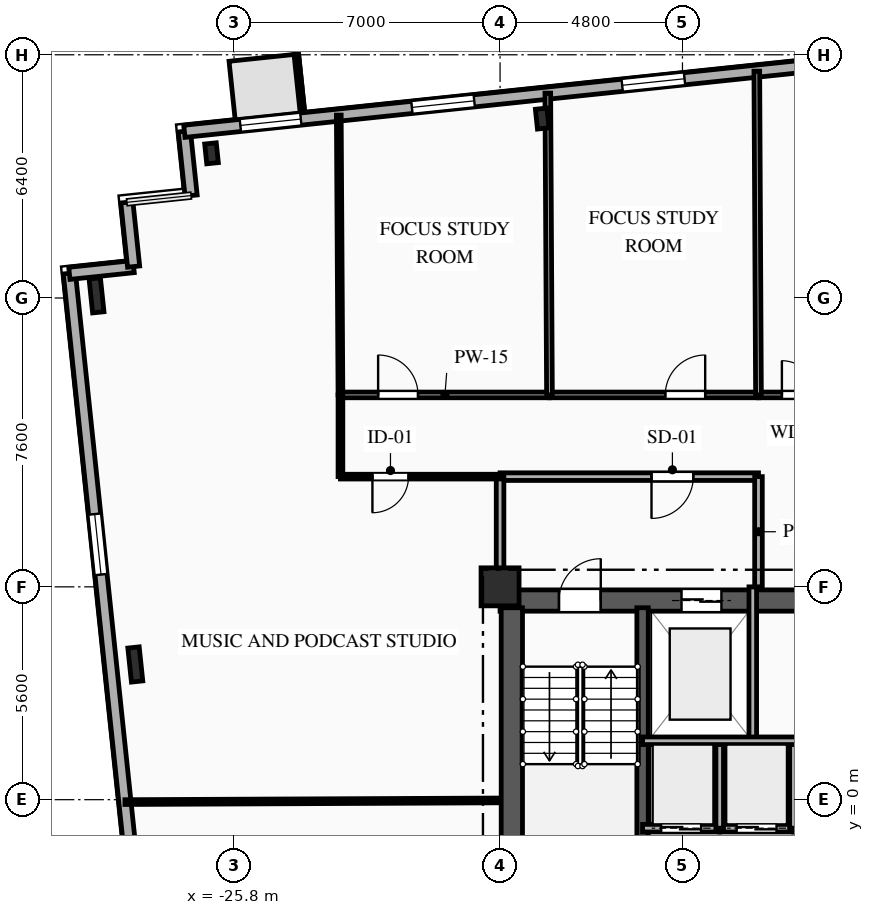
"""IFC4 building model, lengths in metres.
Left out: names, types, materials, properties, quantities, classifications, styles, units other than length and angle.
Written with IfcOpenShell. Run it as: python <this file> out.ifc"""

import sys

from ifc_helpers import new_model, si_unit, direction, frame, frame_2d, origin, origin_2d, place, context, subcontext, project, spatial, rectangle, i_section, extrude, element, fill, save


model = new_model("IFC4")
c1 = context("Model", 3, precision=1e-05, world=origin(), true_north=direction((0.0, 1.0)))
c2 = subcontext(c1, "Body", "Model", "MODEL_VIEW")
j1 = project(units=[si_unit("LENGTHUNIT", "METRE"), si_unit("PLANEANGLEUNIT", "RADIAN")], contexts=[c1])
p1 = place(None, origin())
s1 = spatial("IfcSite", under=j1, at=p1, CompositionType="ELEMENT")
p2 = place(p1, origin())
s2 = spatial("IfcBuilding", under=s1, at=p2, CompositionType="ELEMENT")
p3 = place(p2, frame((0.0, 0.0, 112.5)))
s3 = spatial("IfcBuildingStorey", under=s2, at=p3, CompositionType="ELEMENT", Elevation=112.5)
p4 = place(p3, frame((-18.8, 5.6, 0.0), z_axis=(0.0, 0.0, 1.0), x_axis=(1.0, 0.0, 0.0)))
e1 = element("IfcColumn", 1, at=p4, inside=s3, PredefinedType="COLUMN", context=c2, shape_type="SweptSolid", body=[
    extrude(rectangle(XDim=1.0, YDim=1.0, at=origin_2d()), origin(), (0.0, 0.0, 1.0), 3.35),
])
for number, where, z_axis, x_axis in (
    (2, (-17.691, 17.922, 0.0), (0.0, 0.0, 1.0), (0.995, 0.105, 0.0)),
    (3, (-26.393, 17.007, 0.0), (0.0, 0.0, 1.0), (0.995, 0.105, 0.0)),
):
    element("IfcColumn", number, at=place(p3, frame(where, z_axis=z_axis, x_axis=x_axis)), inside=s3, PredefinedType="COLUMN", context=c2, shape_type="SweptSolid", body=[
        extrude(i_section(OverallWidth=0.306, OverallDepth=0.524, WebThickness=0.021, FlangeThickness=0.04, FilletRadius=0.027, at=origin_2d()), origin(), (0.0, 0.0, 1.0), 3.35),
    ])
for number, where, z_axis, x_axis in (
    (4, (-29.419, 13.271, 0.0), (0.0, 0.0, 1.0), (0.995, 0.105, 0.0)),
    (5, (-28.398, 3.557, 0.0), (0.0, 0.0, 1.0), (0.995, 0.105, 0.0)),
):
    element("IfcColumn", number, at=place(p3, frame(where, z_axis=z_axis, x_axis=x_axis)), inside=s3, PredefinedType="COLUMN", context=c2, shape_type="SweptSolid", body=[
        extrude(i_section(OverallWidth=0.3, OverallDepth=0.9, WebThickness=0.019, FlangeThickness=0.035, FilletRadius=0.03, at=origin_2d()), origin(), (0.0, 0.0, 1.0), 3.35),
    ])
p5 = place(p3, frame((-26.935, -16.583, 0.0), z_axis=(0.0, 0.0, 1.0), x_axis=(-0.104524887486, 0.994522271192, 0.0)))
e6 = element("IfcWall", 6, at=p5, inside=s3, PredefinedType="SOLIDWALL", context=c2, shape_type="SweptSolid", body=[
    extrude(rectangle(XDim=30.6, YDim=0.32, at=frame_2d((15.3, 0.0))), origin(), (0.0, 0.0, 1.0), 3.045),
])
p6 = place(p5, frame((7.746, 0.0, 0.85)))
e7 = element("IfcOpeningElement", 7, at=p6, cuts=e6, PredefinedType="OPENING", context=c2, shape_type="SweptSolid", body=[
    extrude(rectangle(XDim=1.65, YDim=1.85, at=frame_2d((0.825, 0.925))), frame((0.0, 0.17, 0.0), z_axis=(0.0, -1.0, 0.0), x_axis=(1.0, 0.0, 0.0)), (0.0, 0.0, 1.0), 0.34),
])
p7 = place(p5, frame((22.631, 0.0, 0.85)))
e8 = element("IfcOpeningElement", 8, at=p7, cuts=e6, PredefinedType="OPENING", context=c2, shape_type="SweptSolid", body=[
    extrude(rectangle(XDim=1.6, YDim=1.85, at=frame_2d((0.8, 0.925))), frame((0.0, 0.17, 0.0), z_axis=(0.0, -1.0, 0.0), x_axis=(1.0, 0.0, 0.0)), (0.0, 0.0, 1.0), 0.34),
])
for number, where, z_axis, x_axis in (
    (9, (-30.133, 13.849, 0.0), (0.0, 0.0, 1.0), (0.995, 0.104, 0.0)),
    (10, (-28.443, 14.027, 0.0), (0.0, 0.0, 1.0), (-0.105, 0.995, 0.0)),
    (11, (-26.93, 15.895, 0.0), (0.0, 0.0, 1.0), (-0.105, 0.995, 0.0)),
):
    element("IfcWall", number, at=place(p3, frame(where, z_axis=z_axis, x_axis=x_axis)), inside=s3, PredefinedType="SOLIDWALL", context=c2, shape_type="SweptSolid", body=[
        extrude(rectangle(XDim=1.7, YDim=0.32, at=frame_2d((0.85, 0.0))), origin(), (0.0, 0.0, 1.0), 3.045),
    ])
p8 = place(p3, frame((-27.107, 17.586, 0.0), z_axis=(0.0, 0.0, 1.0), x_axis=(0.994521628355, 0.104531003701, 0.0)))
e12 = element("IfcWall", 12, at=p8, inside=s3, PredefinedType="SOLIDWALL", context=c2, shape_type="SweptSolid", body=[
    extrude(rectangle(XDim=53.8, YDim=0.32, at=frame_2d((26.9, 0.0))), origin(), (0.0, 0.0, 1.0), 3.045),
])
p9 = place(p8, frame((1.482, 0.0, 0.85)))
e13 = element("IfcOpeningElement", 13, at=p9, cuts=e12, PredefinedType="OPENING", context=c2, shape_type="SweptSolid", body=[
    extrude(rectangle(XDim=1.6, YDim=1.85, at=frame_2d((0.8, 0.925))), frame((0.0, 0.17, 0.0), z_axis=(0.0, -1.0, 0.0), x_axis=(1.0, 0.0, 0.0)), (0.0, 0.0, 1.0), 0.34),
])
p10 = place(p8, frame((6.02, 0.0, 0.85)))
e14 = element("IfcOpeningElement", 14, at=p10, cuts=e12, PredefinedType="OPENING", context=c2, shape_type="SweptSolid", body=[
    extrude(rectangle(XDim=1.65, YDim=1.85, at=frame_2d((0.825, 0.925))), frame((0.0, 0.17, 0.0), z_axis=(0.0, -1.0, 0.0), x_axis=(1.0, 0.0, 0.0)), (0.0, 0.0, 1.0), 0.34),
])
p11 = place(p8, frame((11.584, 0.0, 0.85)))
e15 = element("IfcOpeningElement", 15, at=p11, cuts=e12, PredefinedType="OPENING", context=c2, shape_type="SweptSolid", body=[
    extrude(rectangle(XDim=1.65, YDim=1.85, at=frame_2d((0.825, 0.925))), frame((0.0, 0.17, 0.0), z_axis=(0.0, -1.0, 0.0), x_axis=(1.0, 0.0, 0.0)), (0.0, 0.0, 1.0), 0.34),
])
p12 = place(p8, frame((21.336, 0.0, 0.85)))
e16 = element("IfcOpeningElement", 16, at=p12, cuts=e12, PredefinedType="OPENING", context=c2, shape_type="SweptSolid", body=[
    extrude(rectangle(XDim=1.6, YDim=1.85, at=frame_2d((0.8, 0.925))), frame((0.0, 0.17, 0.0), z_axis=(0.0, -1.0, 0.0), x_axis=(1.0, 0.0, 0.0)), (0.0, 0.0, 1.0), 0.34),
])
p13 = place(p8, frame((31.404, 0.0, 0.85)))
e17 = element("IfcOpeningElement", 17, at=p13, cuts=e12, PredefinedType="OPENING", context=c2, shape_type="SweptSolid", body=[
    extrude(rectangle(XDim=2.2, YDim=1.85, at=frame_2d((1.1, 0.925))), frame((0.0, 0.17, 0.0), z_axis=(0.0, -1.0, 0.0), x_axis=(1.0, 0.0, 0.0)), (0.0, 0.0, 1.0), 0.34),
])
p14 = place(p8, frame((40.486, 0.0, 0.85)))
e18 = element("IfcOpeningElement", 18, at=p14, cuts=e12, PredefinedType="OPENING", context=c2, shape_type="SweptSolid", body=[
    extrude(rectangle(XDim=1.65, YDim=1.85, at=frame_2d((0.825, 0.925))), frame((0.0, 0.17, 0.0), z_axis=(0.0, -1.0, 0.0), x_axis=(1.0, 0.0, 0.0)), (0.0, 0.0, 1.0), 0.34),
])
p15 = place(p8, frame((46.53, 0.0, 0.85)))
e19 = element("IfcOpeningElement", 19, at=p15, cuts=e12, PredefinedType="OPENING", context=c2, shape_type="SweptSolid", body=[
    extrude(rectangle(XDim=1.65, YDim=1.85, at=frame_2d((0.825, 0.925))), frame((0.0, 0.17, 0.0), z_axis=(0.0, -1.0, 0.0), x_axis=(1.0, 0.0, 0.0)), (0.0, 0.0, 1.0), 0.34),
])
p16 = place(p8, frame((51.054, 0.0, 0.85)))
e20 = element("IfcOpeningElement", 20, at=p16, cuts=e12, PredefinedType="OPENING", context=c2, shape_type="SweptSolid", body=[
    extrude(rectangle(XDim=1.65, YDim=1.85, at=frame_2d((0.825, 0.925))), frame((0.0, 0.17, 0.0), z_axis=(0.0, -1.0, 0.0), x_axis=(1.0, 0.0, 0.0)), (0.0, 0.0, 1.0), 0.34),
])
p17 = place(p3, frame((-18.8, 5.24, 0.0), z_axis=(0.0, 0.0, 1.0), x_axis=(1.0, 0.0, 0.0)))
e21 = element("IfcWall", 21, at=p17, inside=s3, PredefinedType="SHEAR", context=c2, shape_type="SweptSolid", body=[
    extrude(rectangle(XDim=9.6, YDim=0.56, at=frame_2d((4.8, 0.0))), origin(), (0.0, 0.0, 1.0), 3.045),
])
p18 = place(p17, frame((1.55, 0.0, 0.0)))
e22 = element("IfcOpeningElement", 22, at=p18, cuts=e21, PredefinedType="OPENING", context=c2, shape_type="SweptSolid", body=[
    extrude(rectangle(XDim=1.1, YDim=2.15, at=frame_2d((0.55, 1.075))), frame((0.0, 0.29, 0.0), z_axis=(0.0, -1.0, 0.0), x_axis=(1.0, 0.0, 0.0)), (0.0, 0.0, 1.0), 0.58),
])
p19 = place(p17, frame((4.775, 0.0, 0.0)))
e23 = element("IfcOpeningElement", 23, at=p19, cuts=e21, PredefinedType="OPENING", context=c2, shape_type="SweptSolid", body=[
    extrude(rectangle(XDim=1.05, YDim=2.1, at=frame_2d((0.525, 1.05))), frame((0.0, 0.29, 0.0), z_axis=(0.0, -1.0, 0.0), x_axis=(1.0, 0.0, 0.0)), (0.0, 0.0, 1.0), 0.58),
])
p20 = place(p3, frame((-18.49, -5.05, 0.0), z_axis=(0.0, 0.0, 1.0), x_axis=(0.0, 1.0, 0.0)))
e24 = element("IfcWall", 24, at=p20, inside=s3, PredefinedType="SHEAR", context=c2, shape_type="SweptSolid", body=[
    extrude(rectangle(XDim=10.1, YDim=0.56, at=frame_2d((5.05, 0.0))), origin(), (0.0, 0.0, 1.0), 3.045),
])
p21 = place(p3, frame((-15.05, -5.05, 0.0), z_axis=(0.0, 0.0, 1.0), x_axis=(0.0, 1.0, 0.0)))
e25 = element("IfcWall", 25, at=p21, inside=s3, PredefinedType="SHEAR", context=c2, shape_type="SweptSolid", body=[
    extrude(rectangle(XDim=10.1, YDim=0.3, at=frame_2d((5.05, 0.0))), origin(), (0.0, 0.0, 1.0), 3.045),
])
p22 = place(p3, frame((-12.15, 1.55, 0.0), z_axis=(0.0, 0.0, 1.0), x_axis=(0.0, 1.0, 0.0)))
e26 = element("IfcWall", 26, at=p22, inside=s3, PredefinedType="PARTITIONING", context=c2, shape_type="SweptSolid", body=[
    extrude(rectangle(XDim=4.05, YDim=0.2, at=frame_2d((2.025, 0.0))), origin(), (0.0, 0.0, 1.0), 3.045),
])
p23 = place(p3, frame((-12.0, 8.5, 0.0), z_axis=(0.0, 0.0, 1.0), x_axis=(-1.0, 0.0, 0.0)))
e27 = element("IfcWall", 27, at=p23, inside=s3, PredefinedType="PARTITIONING", context=c2, shape_type="SweptSolid", body=[
    extrude(rectangle(XDim=6.8, YDim=0.2, at=frame_2d((3.4, 0.0))), origin(), (0.0, 0.0, 1.0), 3.045),
])
p24 = place(p23, frame((1.715, 0.0, 0.0)))
e28 = element("IfcOpeningElement", 28, at=p24, cuts=e27, PredefinedType="OPENING", context=c2, shape_type="SweptSolid", body=[
    extrude(rectangle(XDim=1.1, YDim=2.15, at=frame_2d((0.55, 1.075))), frame((0.0, 0.11, 0.0), z_axis=(0.0, -1.0, 0.0), x_axis=(1.0, 0.0, 0.0)), (0.0, 0.0, 1.0), 0.22),
])
p25 = place(p3, frame((-12.0, 5.6, 0.0), z_axis=(0.0, 0.0, 1.0), x_axis=(0.0, 1.0, 0.0)))
e29 = element("IfcWall", 29, at=p25, inside=s3, PredefinedType="PARTITIONING", context=c2, shape_type="SweptSolid", body=[
    extrude(rectangle(XDim=2.9, YDim=0.2, at=frame_2d((1.45, 0.0))), origin(), (0.0, 0.0, 1.0), 3.045),
])
p26 = place(p3, frame((-18.8, 8.5, 0.0), z_axis=(0.0, 0.0, 1.0), x_axis=(0.0, -1.0, 0.0)))
e30 = element("IfcWall", 30, at=p26, inside=s3, PredefinedType="PARTITIONING", context=c2, shape_type="SweptSolid", body=[
    extrude(rectangle(XDim=2.9, YDim=0.2, at=frame_2d((1.45, 0.0))), origin(), (0.0, 0.0, 1.0), 2.53),
])
p27 = place(p3, frame((-13.02, -0.75, 0.0), z_axis=(0.0, 0.0, 1.0), x_axis=(-1.0, 0.0, 0.0)))
e31 = element("IfcWall", 31, at=p27, inside=s3, PredefinedType="PARTITIONING", context=c2, shape_type="SweptSolid", body=[
    extrude(rectangle(XDim=2.03, YDim=0.2, at=frame_2d((1.015, 0.0))), origin(), (0.0, 0.0, 1.0), 3.045),
])
p28 = place(p27, frame((0.49, 0.0, 0.0)))
e32 = element("IfcOpeningElement", 32, at=p28, cuts=e31, PredefinedType="OPENING", context=c2, shape_type="SweptSolid", body=[
    extrude(rectangle(XDim=1.05, YDim=2.1, at=frame_2d((0.525, 1.05))), frame((0.0, 0.11, 0.0), z_axis=(0.0, -1.0, 0.0), x_axis=(1.0, 0.0, 0.0)), (0.0, 0.0, 1.0), 0.22),
])
p29 = place(p3, frame((-11.08, -0.75, 0.0), z_axis=(0.0, 0.0, 1.0), x_axis=(-1.0, 0.0, 0.0)))
e33 = element("IfcWall", 33, at=p29, inside=s3, PredefinedType="PARTITIONING", context=c2, shape_type="SweptSolid", body=[
    extrude(rectangle(XDim=1.94, YDim=0.2, at=frame_2d((0.97, 0.0))), origin(), (0.0, 0.0, 1.0), 3.045),
])
p30 = place(p29, frame((0.445, 0.0, 0.0)))
e34 = element("IfcOpeningElement", 34, at=p30, cuts=e33, PredefinedType="OPENING", context=c2, shape_type="SweptSolid", body=[
    extrude(rectangle(XDim=1.05, YDim=2.1, at=frame_2d((0.525, 1.05))), frame((0.0, 0.11, 0.0), z_axis=(0.0, -1.0, 0.0), x_axis=(1.0, 0.0, 0.0)), (0.0, 0.0, 1.0), 0.22),
])
p31 = place(p3, frame((-9.2, -0.75, 0.0), z_axis=(0.0, 0.0, 1.0), x_axis=(-1.0, 0.0, 0.0)))
e35 = element("IfcWall", 35, at=p31, inside=s3, PredefinedType="PARTITIONING", context=c2, shape_type="SweptSolid", body=[
    extrude(rectangle(XDim=1.88, YDim=0.2, at=frame_2d((0.94, 0.0))), origin(), (0.0, 0.0, 1.0), 3.045),
])
for number, where, z_axis, x_axis in (
    (36, (-13.02, -0.75, 0.0), (0.0, 0.0, 1.0), (0.0, 1.0, 0.0)),
    (37, (-11.08, -0.75, 0.0), (0.0, 0.0, 1.0), (0.0, 1.0, 0.0)),
):
    element("IfcWall", number, at=place(p3, frame(where, z_axis=z_axis, x_axis=x_axis)), inside=s3, PredefinedType="PARTITIONING", context=c2, shape_type="SweptSolid", body=[
        extrude(rectangle(XDim=2.3, YDim=0.2, at=frame_2d((1.15, 0.0))), origin(), (0.0, 0.0, 1.0), 3.045),
    ])
p32 = place(p3, frame((-18.8, 8.5, 0.0), z_axis=(0.0, 0.0, 1.0), x_axis=(-1.0, 0.0, 0.0)))
e38 = element("IfcWall", 38, at=p32, inside=s3, PredefinedType="PARTITIONING", context=c2, shape_type="SweptSolid", body=[
    extrude(rectangle(XDim=4.2, YDim=0.125, at=frame_2d((2.1, 0.0))), origin(), (0.0, 0.0, 1.0), 3.045),
])
p33 = place(p32, frame((2.409, 0.0, 0.0)))
e39 = element("IfcOpeningElement", 39, at=p33, cuts=e38, PredefinedType="OPENING", context=c2, shape_type="SweptSolid", body=[
    extrude(rectangle(XDim=0.95, YDim=2.1, at=frame_2d((0.475, 1.05))), frame((0.0, 0.073, 0.0), z_axis=(0.0, -1.0, 0.0), x_axis=(1.0, 0.0, 0.0)), (0.0, 0.0, 1.0), 0.145),
])
p34 = place(p3, frame((-23.0, 8.5, 0.0), z_axis=(0.0, 0.0, 1.0), x_axis=(0.0, 1.0, 0.0)))
e40 = element("IfcWall", 40, at=p34, inside=s3, PredefinedType="PARTITIONING", context=c2, shape_type="SweptSolid", body=[
    extrude(rectangle(XDim=2.15, YDim=0.125, at=frame_2d((1.075, 0.0))), origin(), (0.0, 0.0, 1.0), 3.045),
])
p35 = place(p3, frame((-23.0, 10.65, 0.0), z_axis=(0.0, 0.0, 1.0), x_axis=(1.0, 0.0, 0.0)))
e41 = element("IfcWall", 41, at=p35, inside=s3, PredefinedType="PARTITIONING", context=c2, shape_type="SweptSolid", body=[
    extrude(rectangle(XDim=5.5, YDim=0.15, at=frame_2d((2.75, 0.0))), origin(), (0.0, 0.0, 1.0), 3.045),
])
p36 = place(p35, frame((0.991, 0.0, 0.0)))
e42 = element("IfcOpeningElement", 42, at=p36, cuts=e41, PredefinedType="OPENING", context=c2, shape_type="SweptSolid", body=[
    extrude(rectangle(XDim=1.05, YDim=2.15, at=frame_2d((0.525, 1.075))), frame((0.0, 0.085, 0.0), z_axis=(0.0, -1.0, 0.0), x_axis=(1.0, 0.0, 0.0)), (0.0, 0.0, 1.0), 0.17),
])
p37 = place(p3, frame((-17.5, 10.65, 0.0), z_axis=(0.0, 0.0, 1.0), x_axis=(1.0, 0.0, 0.0)))
e43 = element("IfcWall", 43, at=p37, inside=s3, PredefinedType="PARTITIONING", context=c2, shape_type="SweptSolid", body=[
    extrude(rectangle(XDim=5.5, YDim=0.15, at=frame_2d((2.75, 0.0))), origin(), (0.0, 0.0, 1.0), 3.045),
])
p38 = place(p37, frame((3.048, 0.0, 0.0)))
e44 = element("IfcOpeningElement", 44, at=p38, cuts=e43, PredefinedType="OPENING", context=c2, shape_type="SweptSolid", body=[
    extrude(rectangle(XDim=1.05, YDim=2.15, at=frame_2d((0.525, 1.075))), frame((0.0, 0.085, 0.0), z_axis=(0.0, -1.0, 0.0), x_axis=(1.0, 0.0, 0.0)), (0.0, 0.0, 1.0), 0.17),
])
p39 = place(p3, frame((-12.0, 10.65, 0.0), z_axis=(0.0, 0.0, 1.0), x_axis=(1.0, 0.0, 0.0)))
e45 = element("IfcWall", 45, at=p39, inside=s3, PredefinedType="PLUMBINGWALL", context=c2, shape_type="SweptSolid", body=[
    extrude(rectangle(XDim=2.35, YDim=0.15, at=frame_2d((1.175, 0.0))), origin(), (0.0, 0.0, 1.0), 3.045),
])
p40 = place(p39, frame((0.616, 0.0, 0.0)))
e46 = element("IfcOpeningElement", 46, at=p40, cuts=e45, PredefinedType="OPENING", context=c2, shape_type="SweptSolid", body=[
    extrude(rectangle(XDim=0.9, YDim=2.1, at=frame_2d((0.45, 1.05))), frame((0.0, 0.085, 0.0), z_axis=(0.0, -1.0, 0.0), x_axis=(1.0, 0.0, 0.0)), (0.0, 0.0, 1.0), 0.17),
])
p41 = place(p3, frame((-28.671, -0.064, 0.0), z_axis=(0.0, 0.0, 1.0), x_axis=(0.999990089865, 0.004451985263, 0.0)))
e47 = element("IfcWall", 47, at=p41, inside=s3, PredefinedType="PARTITIONING", context=c2, shape_type="SweptSolid", body=[
    extrude(rectangle(XDim=9.871, YDim=0.125, at=frame_2d((4.936, 0.0))), origin(), (0.0, 0.0, 1.0), 3.045),
])
p42 = place(p3, frame((-23.044, 18.013, 0.0), z_axis=(0.0, 0.0, 1.0), x_axis=(0.005968459246, -0.999982188588, 0.0)))
e48 = element("IfcWall", 48, at=p42, inside=s3, PredefinedType="PARTITIONING", context=c2, shape_type="SweptSolid", body=[
    extrude(rectangle(XDim=7.363, YDim=0.125, at=frame_2d((3.682, 0.0))), origin(), (0.0, 0.0, 1.0), 3.045),
])
p43 = place(p3, frame((-17.544, 18.591, 0.0), z_axis=(0.0, 0.0, 1.0), x_axis=(0.005533949572, -0.999984687584, 0.0)))
e49 = element("IfcWall", 49, at=p43, inside=s3, PredefinedType="PARTITIONING", context=c2, shape_type="SweptSolid", body=[
    extrude(rectangle(XDim=7.941, YDim=0.15, at=frame_2d((3.97, 0.0))), origin(), (0.0, 0.0, 1.0), 2.53),
])
p44 = place(p3, frame((-12.044, 19.169, 0.0), z_axis=(0.0, 0.0, 1.0), x_axis=(0.005158411336, -0.999986695308, 0.0)))
e50 = element("IfcWall", 50, at=p44, inside=s3, PredefinedType="PLUMBINGWALL", context=c2, shape_type="SweptSolid", body=[
    extrude(rectangle(XDim=8.519, YDim=0.15, at=frame_2d((4.26, 0.0))), origin(), (0.0, 0.0, 1.0), 3.045),
])
p45 = place(p3, frame((-15.05, 1.55, 0.0), z_axis=(0.0, 0.0, 1.0), x_axis=(1.0, 0.0, 0.0)))
e51 = element("IfcWall", 51, at=p45, inside=s3, PredefinedType="PARTITIONING", context=c2, shape_type="SweptSolid", body=[
    extrude(rectangle(XDim=5.85, YDim=0.2, at=frame_2d((2.925, 0.0))), origin(), (0.0, 0.0, 1.0), 3.045),
])
p46 = place(p7, origin())
e52 = element("IfcWindow", 52, at=p46, inside=s3, PartitioningType="SINGLE_PANEL", PredefinedType="WINDOW", context=c2, shape_type="SweptSolid", body=[
    extrude(rectangle(XDim=1.6, YDim=1.85, at=frame_2d((0.8, 0.925))), frame((0.0, 0.03, 0.0), z_axis=(0.0, -1.0, 0.0), x_axis=(1.0, 0.0, 0.0)), (0.0, 0.0, 1.0), 0.06),
])
fill(e8, e52)
p47 = place(p9, origin())
e53 = element("IfcWindow", 53, at=p47, inside=s3, PartitioningType="SINGLE_PANEL", PredefinedType="WINDOW", context=c2, shape_type="SweptSolid", body=[
    extrude(rectangle(XDim=1.6, YDim=1.85, at=frame_2d((0.8, 0.925))), frame((0.0, 0.03, 0.0), z_axis=(0.0, -1.0, 0.0), x_axis=(1.0, 0.0, 0.0)), (0.0, 0.0, 1.0), 0.06),
])
fill(e13, e53)
p48 = place(p10, origin())
e54 = element("IfcWindow", 54, at=p48, inside=s3, PartitioningType="SINGLE_PANEL", PredefinedType="WINDOW", context=c2, shape_type="SweptSolid", body=[
    extrude(rectangle(XDim=1.65, YDim=1.85, at=frame_2d((0.825, 0.925))), frame((0.0, 0.03, 0.0), z_axis=(0.0, -1.0, 0.0), x_axis=(1.0, 0.0, 0.0)), (0.0, 0.0, 1.0), 0.06),
])
fill(e14, e54)
p49 = place(p11, origin())
e55 = element("IfcWindow", 55, at=p49, inside=s3, PartitioningType="SINGLE_PANEL", PredefinedType="WINDOW", context=c2, shape_type="SweptSolid", body=[
    extrude(rectangle(XDim=1.65, YDim=1.85, at=frame_2d((0.825, 0.925))), frame((0.0, 0.03, 0.0), z_axis=(0.0, -1.0, 0.0), x_axis=(1.0, 0.0, 0.0)), (0.0, 0.0, 1.0), 0.06),
])
fill(e15, e55)
p50 = place(p18, origin())
e56 = element("IfcDoor", 56, at=p50, inside=s3, OperationType="SINGLE_SWING_RIGHT", PredefinedType="DOOR", context=c2, shape_type="SweptSolid", body=[
    extrude(rectangle(XDim=1.1, YDim=2.15, at=frame_2d((0.55, 1.075))), frame((0.0, 0.025, 0.0), z_axis=(0.0, -1.0, 0.0), x_axis=(1.0, 0.0, 0.0)), (0.0, 0.0, 1.0), 0.05),
])
fill(e22, e56)
p51 = place(p19, origin())
e57 = element("IfcDoor", 57, at=p51, inside=s3, OperationType="DOUBLE_DOOR_SLIDING", PredefinedType="DOOR", context=c2, shape_type="SweptSolid", body=[
    extrude(rectangle(XDim=1.05, YDim=2.1, at=frame_2d((0.525, 1.05))), frame((0.0, 0.025, 0.0), z_axis=(0.0, -1.0, 0.0), x_axis=(1.0, 0.0, 0.0)), (0.0, 0.0, 1.0), 0.05),
])
fill(e23, e57)
p52 = place(p24, origin())
e58 = element("IfcDoor", 58, at=p52, inside=s3, OperationType="SINGLE_SWING_RIGHT", PredefinedType="DOOR", context=c2, shape_type="SweptSolid", body=[
    extrude(rectangle(XDim=1.1, YDim=2.15, at=frame_2d((0.55, 1.075))), frame((0.0, 0.025, 0.0), z_axis=(0.0, -1.0, 0.0), x_axis=(1.0, 0.0, 0.0)), (0.0, 0.0, 1.0), 0.05),
])
fill(e28, e58)
p53 = place(p28, origin())
e59 = element("IfcDoor", 59, at=p53, inside=s3, OperationType="DOUBLE_DOOR_SLIDING", PredefinedType="DOOR", context=c2, shape_type="SweptSolid", body=[
    extrude(rectangle(XDim=1.05, YDim=2.1, at=frame_2d((0.525, 1.05))), frame((0.0, 0.025, 0.0), z_axis=(0.0, -1.0, 0.0), x_axis=(1.0, 0.0, 0.0)), (0.0, 0.0, 1.0), 0.05),
])
fill(e32, e59)
p54 = place(p30, origin())
e60 = element("IfcDoor", 60, at=p54, inside=s3, OperationType="DOUBLE_DOOR_SLIDING", PredefinedType="DOOR", context=c2, shape_type="SweptSolid", body=[
    extrude(rectangle(XDim=1.05, YDim=2.1, at=frame_2d((0.525, 1.05))), frame((0.0, 0.025, 0.0), z_axis=(0.0, -1.0, 0.0), x_axis=(1.0, 0.0, 0.0)), (0.0, 0.0, 1.0), 0.05),
])
fill(e34, e60)
p55 = place(p33, origin())
e61 = element("IfcDoor", 61, at=p55, inside=s3, OperationType="SINGLE_SWING_RIGHT", PredefinedType="DOOR", context=c2, shape_type="SweptSolid", body=[
    extrude(rectangle(XDim=0.95, YDim=2.1, at=frame_2d((0.475, 1.05))), frame((0.0, 0.025, 0.0), z_axis=(0.0, -1.0, 0.0), x_axis=(1.0, 0.0, 0.0)), (0.0, 0.0, 1.0), 0.05),
])
fill(e39, e61)
p56 = place(p36, origin())
e62 = element("IfcDoor", 62, at=p56, inside=s3, OperationType="SINGLE_SWING_LEFT", PredefinedType="DOOR", context=c2, shape_type="SweptSolid", body=[
    extrude(rectangle(XDim=1.05, YDim=2.15, at=frame_2d((0.525, 1.075))), frame((0.0, 0.025, 0.0), z_axis=(0.0, -1.0, 0.0), x_axis=(1.0, 0.0, 0.0)), (0.0, 0.0, 1.0), 0.05),
])
fill(e42, e62)
p57 = place(p38, origin())
e63 = element("IfcDoor", 63, at=p57, inside=s3, OperationType="SINGLE_SWING_RIGHT", PredefinedType="DOOR", context=c2, shape_type="SweptSolid", body=[
    extrude(rectangle(XDim=1.05, YDim=2.15, at=frame_2d((0.525, 1.075))), frame((0.0, 0.025, 0.0), z_axis=(0.0, -1.0, 0.0), x_axis=(1.0, 0.0, 0.0)), (0.0, 0.0, 1.0), 0.05),
])
fill(e44, e63)
p58 = place(p40, origin())
e64 = element("IfcDoor", 64, at=p58, inside=s3, OperationType="SINGLE_SWING_LEFT", PredefinedType="DOOR", context=c2, shape_type="SweptSolid", body=[
    extrude(rectangle(XDim=0.9, YDim=2.1, at=frame_2d((0.45, 1.05))), frame((0.0, 0.025, 0.0), z_axis=(0.0, -1.0, 0.0), x_axis=(1.0, 0.0, 0.0)), (0.0, 0.0, 1.0), 0.05),
])
fill(e46, e64)
save(model, sys.argv[1])
